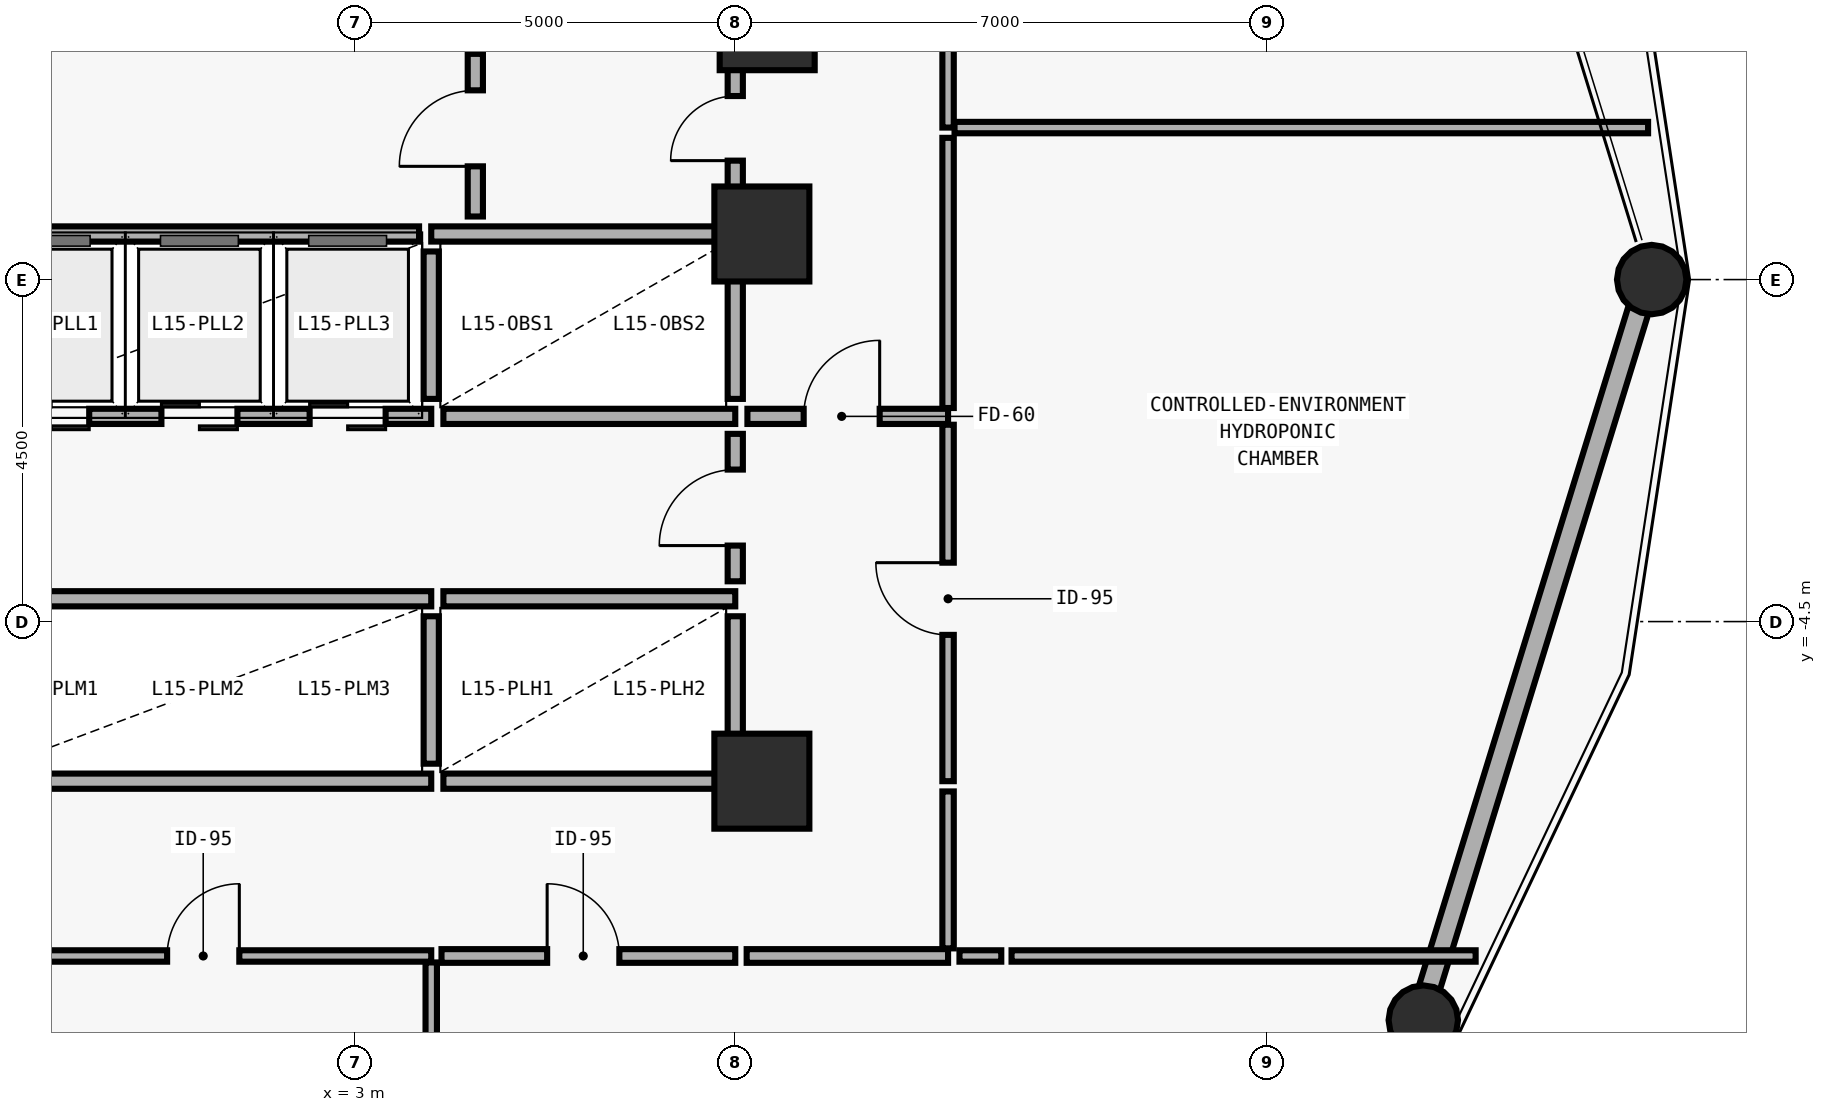
"""IFC4 building model, lengths in metres.
Left out: names, types, materials, properties, quantities, classifications, styles, units other than length and angle.
Written with IfcOpenShell. Run it as: python <this file> out.ifc"""

import sys

from ifc_helpers import new_model, si_unit, direction, frame, frame_2d, origin, origin_2d, place, context, subcontext, project, spatial, rectangle, hollow_circle, extrude, element, fill, save


model = new_model("IFC4")
c1 = context("Model", 3, precision=1e-05, world=origin(), true_north=direction((0.0, 1.0)))
c2 = subcontext(c1, "Body", "Model", "MODEL_VIEW")
j1 = project(units=[si_unit("LENGTHUNIT", "METRE"), si_unit("PLANEANGLEUNIT", "RADIAN")], contexts=[c1])
p1 = place(None, origin())
s1 = spatial("IfcSite", under=j1, at=p1, CompositionType="ELEMENT")
p2 = place(p1, origin())
s2 = spatial("IfcBuilding", under=s1, at=p2, CompositionType="ELEMENT")
p3 = place(p2, frame((0.0, 0.0, 62.7)))
s3 = spatial("IfcBuildingStorey", under=s2, at=p3, CompositionType="ELEMENT", Elevation=62.7)
for number, where, z_axis, x_axis in (
    (1, (8.42, 3.38, 0.0), (0.0, 0.0, 1.0), (1.0, 0.0, 0.0)),
    (2, (8.35, 0.6, 0.0), (0.0, 0.0, 1.0), (1.0, 0.0, 0.0)),
    (3, (8.35, -6.6, 0.0), (0.0, 0.0, 1.0), (1.0, 0.0, 0.0)),
):
    element("IfcColumn", number, at=place(p3, frame(where, z_axis=z_axis, x_axis=x_axis)), inside=s3, PredefinedType="COLUMN", context=c2, shape_type="SweptSolid", body=[
        extrude(rectangle(XDim=1.25, YDim=1.25, at=origin_2d()), origin(), (0.0, 0.0, 1.0), 3.875),
    ])
p4 = place(p3, frame((20.006, 0.0, 0.0), z_axis=(0.026515371649, 0.0, 0.999648405724), x_axis=(0.0, 1.0, 0.0)))
e4 = element("IfcColumn", 4, at=p4, inside=s3, PredefinedType="COLUMN", context=c2, shape_type="SweptSolid", body=[
    extrude(hollow_circle(Radius=0.457, WallThickness=0.032, at=origin_2d()), origin(), (0.0, 0.0, 1.0), 3.876),
])
p5 = place(p3, frame((17.008, -9.724, 0.0), z_axis=(0.022989211418, -0.01014044668, 0.999684283911), x_axis=(0.403578491135, 0.914945026487, 0.0)))
e5 = element("IfcColumn", 5, at=p5, inside=s3, PredefinedType="COLUMN", context=c2, shape_type="SweptSolid", body=[
    extrude(hollow_circle(Radius=0.457, WallThickness=0.032, at=origin_2d()), origin(), (0.0, 0.0, 1.0), 3.876),
])
p6 = place(p3, frame((19.885, -0.394, 0.0), z_axis=(0.0, 0.0, 1.0), x_axis=(-0.294639825204, -0.95560837868, 0.0)))
e6 = element("IfcWall", 6, at=p6, inside=s3, PredefinedType="SOLIDWALL", context=c2, shape_type="SweptSolid", body=[
    extrude(rectangle(XDim=9.352, YDim=0.28, at=frame_2d((4.676, 0.0))), origin(), (0.0, 0.0, 1.0), 3.06),
])
p7 = place(p3, frame((4.0, 0.6, 0.0), z_axis=(0.0, 0.0, 1.0), x_axis=(1.0, 0.0, 0.0)))
e7 = element("IfcWall", 7, at=p7, inside=s3, PredefinedType="SOLIDWALL", context=c2, shape_type="SweptSolid", body=[
    extrude(rectangle(XDim=3.88, YDim=0.2, at=frame_2d((1.94, 0.0))), origin(), (0.0, 0.0, 1.0), 3.122),
])
p8 = place(p3, frame((-2.0, -1.8, 0.0), z_axis=(0.0, 0.0, 1.0), x_axis=(1.0, 0.0, 0.0)))
e8 = element("IfcWall", 8, at=p8, inside=s3, PredefinedType="SOLIDWALL", context=c2, shape_type="SweptSolid", body=[
    extrude(rectangle(XDim=6.0, YDim=0.2, at=frame_2d((3.0, 0.0))), origin(), (0.0, 0.0, 1.0), 3.64),
])
p9 = place(p8, frame((0.5, 0.0, 0.0)))
e9 = element("IfcOpeningElement", 9, at=p9, cuts=e8, PredefinedType="OPENING", context=c2, shape_type="SweptSolid", body=[
    extrude(rectangle(XDim=1.0, YDim=2.2, at=frame_2d((0.5, 1.1))), frame((0.0, 0.11, 0.0), z_axis=(0.0, -1.0, 0.0), x_axis=(1.0, 0.0, 0.0)), (0.0, 0.0, 1.0), 0.22),
])
p10 = place(p8, frame((2.45, 0.0, 0.0)))
e10 = element("IfcOpeningElement", 10, at=p10, cuts=e8, PredefinedType="OPENING", context=c2, shape_type="SweptSolid", body=[
    extrude(rectangle(XDim=1.0, YDim=2.2, at=frame_2d((0.5, 1.1))), frame((0.0, 0.11, 0.0), z_axis=(0.0, -1.0, 0.0), x_axis=(1.0, 0.0, 0.0)), (0.0, 0.0, 1.0), 0.22),
])
p11 = place(p8, frame((4.4, 0.0, 0.0)))
e11 = element("IfcOpeningElement", 11, at=p11, cuts=e8, PredefinedType="OPENING", context=c2, shape_type="SweptSolid", body=[
    extrude(rectangle(XDim=1.0, YDim=2.2, at=frame_2d((0.5, 1.1))), frame((0.0, 0.11, 0.0), z_axis=(0.0, -1.0, 0.0), x_axis=(1.0, 0.0, 0.0)), (0.0, 0.0, 1.0), 0.22),
])
p12 = place(p3, frame((4.16, -1.8, 0.0), z_axis=(0.0, 0.0, 1.0), x_axis=(1.0, 0.0, 0.0)))
e12 = element("IfcWall", 12, at=p12, inside=s3, PredefinedType="SOLIDWALL", context=c2, shape_type="SweptSolid", body=[
    extrude(rectangle(XDim=3.84, YDim=0.2, at=frame_2d((1.92, 0.0))), origin(), (0.0, 0.0, 1.0), 3.64),
])
p13 = place(p3, frame((4.0, -1.57, 0.0), z_axis=(0.0, 0.0, 1.0), x_axis=(0.0, 1.0, 0.0)))
e13 = element("IfcWall", 13, at=p13, inside=s3, PredefinedType="SOLIDWALL", context=c2, shape_type="SweptSolid", body=[
    extrude(rectangle(XDim=1.94, YDim=0.2, at=frame_2d((0.97, 0.0))), origin(), (0.0, 0.0, 1.0), 3.64),
])
p14 = place(p3, frame((8.0, -1.57, 0.0), z_axis=(0.0, 0.0, 1.0), x_axis=(0.0, 1.0, 0.0)))
e14 = element("IfcWall", 14, at=p14, inside=s3, PredefinedType="SOLIDWALL", context=c2, shape_type="SweptSolid", body=[
    extrude(rectangle(XDim=2.05, YDim=0.2, at=frame_2d((1.025, 0.0))), origin(), (0.0, 0.0, 1.0), 3.072),
])
p15 = place(p3, frame((-2.0, -4.2, 0.0), z_axis=(0.0, 0.0, 1.0), x_axis=(1.0, 0.0, 0.0)))
e15 = element("IfcWall", 15, at=p15, inside=s3, PredefinedType="SOLIDWALL", context=c2, shape_type="SweptSolid", body=[
    extrude(rectangle(XDim=6.0, YDim=0.2, at=frame_2d((3.0, 0.0))), origin(), (0.0, 0.0, 1.0), 3.64),
])
p16 = place(p3, frame((-2.0, -6.6, 0.0), z_axis=(0.0, 0.0, 1.0), x_axis=(1.0, 0.0, 0.0)))
e16 = element("IfcWall", 16, at=p16, inside=s3, PredefinedType="SOLIDWALL", context=c2, shape_type="SweptSolid", body=[
    extrude(rectangle(XDim=6.0, YDim=0.2, at=frame_2d((3.0, 0.0))), origin(), (0.0, 0.0, 1.0), 3.122),
])
p17 = place(p3, frame((4.16, -4.2, 0.0), z_axis=(0.0, 0.0, 1.0), x_axis=(1.0, 0.0, 0.0)))
e17 = element("IfcWall", 17, at=p17, inside=s3, PredefinedType="SOLIDWALL", context=c2, shape_type="SweptSolid", body=[
    extrude(rectangle(XDim=3.84, YDim=0.2, at=frame_2d((1.92, 0.0))), origin(), (0.0, 0.0, 1.0), 3.64),
])
p18 = place(p3, frame((4.16, -6.6, 0.0), z_axis=(0.0, 0.0, 1.0), x_axis=(1.0, 0.0, 0.0)))
e18 = element("IfcWall", 18, at=p18, inside=s3, PredefinedType="SOLIDWALL", context=c2, shape_type="SweptSolid", body=[
    extrude(rectangle(XDim=3.84, YDim=0.2, at=frame_2d((1.92, 0.0))), origin(), (0.0, 0.0, 1.0), 3.122),
])
p19 = place(p3, frame((4.0, -6.37, 0.0), z_axis=(0.0, 0.0, 1.0), x_axis=(0.0, 1.0, 0.0)))
e19 = element("IfcWall", 19, at=p19, inside=s3, PredefinedType="SOLIDWALL", context=c2, shape_type="SweptSolid", body=[
    extrude(rectangle(XDim=1.94, YDim=0.2, at=frame_2d((0.97, 0.0))), origin(), (0.0, 0.0, 1.0), 3.64),
])
p20 = place(p3, frame((8.0, -6.37, 0.0), z_axis=(0.0, 0.0, 1.0), x_axis=(0.0, 1.0, 0.0)))
e20 = element("IfcWall", 20, at=p20, inside=s3, PredefinedType="SOLIDWALL", context=c2, shape_type="SweptSolid", body=[
    extrude(rectangle(XDim=1.94, YDim=0.2, at=frame_2d((0.97, 0.0))), origin(), (0.0, 0.0, 1.0), 3.072),
])
p21 = place(p3, frame((4.58, 0.83, 0.0), z_axis=(0.0, 0.0, 1.0), x_axis=(0.0, 1.0, 0.0)))
e21 = element("IfcWall", 21, at=p21, inside=s3, PredefinedType="MOVABLE", context=c2, shape_type="SweptSolid", body=[
    extrude(rectangle(XDim=2.14, YDim=0.2, at=frame_2d((1.07, 0.0))), origin(), (0.0, 0.0, 1.0), 3.64),
])
p22 = place(p21, frame((0.66, 0.0, 0.0)))
e22 = element("IfcOpeningElement", 22, at=p22, cuts=e21, PredefinedType="OPENING", context=c2, shape_type="SweptSolid", body=[
    extrude(rectangle(XDim=1.0, YDim=2.1, at=frame_2d((0.5, 1.05))), frame((0.0, 0.11, 0.0), z_axis=(0.0, -1.0, 0.0), x_axis=(1.0, 0.0, 0.0)), (0.0, 0.0, 1.0), 0.22),
])
p23 = place(p3, frame((8.0, 0.72, 0.0), z_axis=(0.0, 0.0, 1.0), x_axis=(0.0, 1.0, 0.0)))
e23 = element("IfcWall", 23, at=p23, inside=s3, PredefinedType="MOVABLE", context=c2, shape_type="SweptSolid", body=[
    extrude(rectangle(XDim=2.25, YDim=0.2, at=frame_2d((1.125, 0.0))), origin(), (0.0, 0.0, 1.0), 2.872),
])
p24 = place(p23, frame((0.845, 0.0, 0.0)))
e24 = element("IfcOpeningElement", 24, at=p24, cuts=e23, PredefinedType="OPENING", context=c2, shape_type="SweptSolid", body=[
    extrude(rectangle(XDim=0.85, YDim=2.1, at=frame_2d((0.425, 1.05))), frame((0.0, 0.11, 0.0), z_axis=(0.0, -1.0, 0.0), x_axis=(1.0, 0.0, 0.0)), (0.0, 0.0, 1.0), 0.22),
])
p25 = place(p3, frame((8.0, -3.97, 0.0), z_axis=(0.0, 0.0, 1.0), x_axis=(0.0, 1.0, 0.0)))
e25 = element("IfcWall", 25, at=p25, inside=s3, PredefinedType="MOVABLE", context=c2, shape_type="SweptSolid", body=[
    extrude(rectangle(XDim=1.94, YDim=0.2, at=frame_2d((0.97, 0.0))), origin(), (0.0, 0.0, 1.0), 3.072),
])
p26 = place(p25, frame((0.47, 0.0, 0.0)))
e26 = element("IfcOpeningElement", 26, at=p26, cuts=e25, PredefinedType="OPENING", context=c2, shape_type="SweptSolid", body=[
    extrude(rectangle(XDim=1.0, YDim=2.1, at=frame_2d((0.5, 1.05))), frame((0.0, 0.11, 0.0), z_axis=(0.0, -1.0, 0.0), x_axis=(1.0, 0.0, 0.0)), (0.0, 0.0, 1.0), 0.22),
])
p27 = place(p3, frame((8.16, -1.8, 0.0), z_axis=(0.0, 0.0, 1.0), x_axis=(1.0, 0.0, 0.0)))
e27 = element("IfcWall", 27, at=p27, inside=s3, PredefinedType="MOVABLE", context=c2, shape_type="SweptSolid", body=[
    extrude(rectangle(XDim=2.64, YDim=0.2, at=frame_2d((1.32, 0.0))), origin(), (0.0, 0.0, 1.0), 3.64),
])
p28 = place(p27, frame((0.74, 0.0, 0.0)))
e28 = element("IfcOpeningElement", 28, at=p28, cuts=e27, PredefinedType="OPENING", context=c2, shape_type="SweptSolid", body=[
    extrude(rectangle(XDim=1.0, YDim=2.1, at=frame_2d((0.5, 1.05))), frame((0.0, 0.11, 0.0), z_axis=(0.0, -1.0, 0.0), x_axis=(1.0, 0.0, 0.0)), (0.0, 0.0, 1.0), 0.22),
])
p29 = place(p3, frame((-2.0, -8.9, 0.0), z_axis=(0.0, 0.0, 1.0), x_axis=(1.0, 0.0, 0.0)))
e29 = element("IfcWall", 29, at=p29, inside=s3, PredefinedType="PARTITIONING", context=c2, shape_type="SweptSolid", body=[
    extrude(rectangle(XDim=6.0, YDim=0.15, at=frame_2d((3.0, 0.0))), origin(), (0.0, 0.0, 1.0), 3.64),
])
p30 = place(p29, frame((2.525, 0.0, 0.0)))
e30 = element("IfcOpeningElement", 30, at=p30, cuts=e29, PredefinedType="OPENING", context=c2, shape_type="SweptSolid", body=[
    extrude(rectangle(XDim=0.95, YDim=2.1, at=frame_2d((0.475, 1.05))), frame((0.0, 0.085, 0.0), z_axis=(0.0, -1.0, 0.0), x_axis=(1.0, 0.0, 0.0)), (0.0, 0.0, 1.0), 0.17),
])
p31 = place(p3, frame((4.135, -8.9, 0.0), z_axis=(0.0, 0.0, 1.0), x_axis=(1.0, 0.0, 0.0)))
e31 = element("IfcWall", 31, at=p31, inside=s3, PredefinedType="PLUMBINGWALL", context=c2, shape_type="SweptSolid", body=[
    extrude(rectangle(XDim=3.865, YDim=0.18, at=frame_2d((1.933, 0.0))), origin(), (0.0, 0.0, 1.0), 3.64),
])
p32 = place(p31, frame((1.39, 0.0, 0.0)))
e32 = element("IfcOpeningElement", 32, at=p32, cuts=e31, PredefinedType="OPENING", context=c2, shape_type="SweptSolid", body=[
    extrude(rectangle(XDim=0.95, YDim=2.1, at=frame_2d((0.475, 1.05))), frame((0.0, 0.1, 0.0), z_axis=(0.0, -1.0, 0.0), x_axis=(1.0, 0.0, 0.0)), (0.0, 0.0, 1.0), 0.2),
])
p33 = place(p3, frame((10.8, -6.6, 0.0), z_axis=(0.0, 0.0, 1.0), x_axis=(0.0, 1.0, 0.0)))
e33 = element("IfcWall", 33, at=p33, inside=s3, PredefinedType="PARTITIONING", context=c2, shape_type="SweptSolid", body=[
    extrude(rectangle(XDim=4.69, YDim=0.15, at=frame_2d((2.345, 0.0))), origin(), (0.0, 0.0, 1.0), 3.64),
])
p34 = place(p33, frame((1.925, 0.0, 0.0)))
e34 = element("IfcOpeningElement", 34, at=p34, cuts=e33, PredefinedType="OPENING", context=c2, shape_type="SweptSolid", body=[
    extrude(rectangle(XDim=0.95, YDim=2.1, at=frame_2d((0.475, 1.05))), frame((0.0, 0.085, 0.0), z_axis=(0.0, -1.0, 0.0), x_axis=(1.0, 0.0, 0.0)), (0.0, 0.0, 1.0), 0.17),
])
p35 = place(p3, frame((10.8, 2.0, 0.0), z_axis=(0.0, 0.0, 1.0), x_axis=(0.0, 1.0, 0.0)))
e35 = element("IfcWall", 35, at=p35, inside=s3, PredefinedType="PARTITIONING", context=c2, shape_type="SweptSolid", body=[
    extrude(rectangle(XDim=10.5, YDim=0.15, at=frame_2d((5.25, 0.0))), origin(), (0.0, 0.0, 1.0), 3.64),
])
p36 = place(p35, frame((4.775, 0.0, 0.0)))
e36 = element("IfcOpeningElement", 36, at=p36, cuts=e35, PredefinedType="OPENING", context=c2, shape_type="SweptSolid", body=[
    extrude(rectangle(XDim=0.95, YDim=2.1, at=frame_2d((0.475, 1.05))), frame((0.0, 0.085, 0.0), z_axis=(0.0, -1.0, 0.0), x_axis=(1.0, 0.0, 0.0)), (0.0, 0.0, 1.0), 0.17),
])
p37 = place(p3, frame((-1.88, 0.6, 0.0), z_axis=(0.0, 0.0, 1.0), x_axis=(1.0, 0.0, 0.0)))
e37 = element("IfcWall", 37, at=p37, inside=s3, PredefinedType="MOVABLE", context=c2, shape_type="SweptSolid", body=[
    extrude(rectangle(XDim=5.72, YDim=0.2, at=frame_2d((2.86, 0.0))), origin(), (0.0, 0.0, 1.0), 3.122),
])
p38 = place(p3, frame((4.0, -8.985, 0.0), z_axis=(0.0, 0.0, 1.0), x_axis=(0.0, -1.0, 0.0)))
e38 = element("IfcWall", 38, at=p38, inside=s3, PredefinedType="PARTITIONING", context=c2, shape_type="SweptSolid", body=[
    extrude(rectangle(XDim=10.204, YDim=0.15, at=frame_2d((5.102, 0.0))), origin(), (0.0, 0.0, 1.0), 3.64),
])
p39 = place(p3, frame((8.15, -8.9, 0.0), z_axis=(0.0, 0.0, 1.0), x_axis=(1.0, 0.0, 0.0)))
e39 = element("IfcWall", 39, at=p39, inside=s3, PredefinedType="PLUMBINGWALL", context=c2, shape_type="SweptSolid", body=[
    extrude(rectangle(XDim=2.65, YDim=0.18, at=frame_2d((1.325, 0.0))), origin(), (0.0, 0.0, 1.0), 3.64),
])
p40 = place(p3, frame((10.95, -8.9, 0.0), z_axis=(0.0, 0.0, 1.0), x_axis=(1.0, 0.0, 0.0)))
e40 = element("IfcWall", 40, at=p40, inside=s3, PredefinedType="PARTITIONING", context=c2, shape_type="SweptSolid", body=[
    extrude(rectangle(XDim=0.55, YDim=0.15, at=frame_2d((0.275, 0.0))), origin(), (0.0, 0.0, 1.0), 3.64),
])
p41 = place(p3, frame((11.635, -8.9, 0.0), z_axis=(0.0, 0.0, 1.0), x_axis=(1.0, 0.0, 0.0)))
e41 = element("IfcWall", 41, at=p41, inside=s3, PredefinedType="PARTITIONING", context=c2, shape_type="SweptSolid", body=[
    extrude(rectangle(XDim=6.106, YDim=0.15, at=frame_2d((3.053, 0.0))), origin(), (0.0, 0.0, 1.0), 2.972),
])
p42 = place(p3, frame((10.8, -8.8, 0.0), z_axis=(0.0, 0.0, 1.0), x_axis=(0.0, 1.0, 0.0)))
e42 = element("IfcWall", 42, at=p42, inside=s3, PredefinedType="PARTITIONING", context=c2, shape_type="SweptSolid", body=[
    extrude(rectangle(XDim=2.065, YDim=0.15, at=frame_2d((1.032, 0.0))), origin(), (0.0, 0.0, 1.0), 3.64),
])
p43 = place(p3, frame((10.8, -1.69, 0.0), z_axis=(0.0, 0.0, 1.0), x_axis=(0.0, 1.0, 0.0)))
e43 = element("IfcWall", 43, at=p43, inside=s3, PredefinedType="PARTITIONING", context=c2, shape_type="SweptSolid", body=[
    extrude(rectangle(XDim=3.555, YDim=0.15, at=frame_2d((1.777, 0.0))), origin(), (0.0, 0.0, 1.0), 3.64),
])
p44 = place(p3, frame((10.885, 2.0, 0.0), z_axis=(0.0, 0.0, 1.0), x_axis=(1.0, 0.0, 0.0)))
e44 = element("IfcWall", 44, at=p44, inside=s3, PredefinedType="PARTITIONING", context=c2, shape_type="SweptSolid", body=[
    extrude(rectangle(XDim=9.125, YDim=0.15, at=frame_2d((4.562, 0.0))), origin(), (0.0, 0.0, 1.0), 3.64),
])
p45 = place(p22, origin())
e45 = element("IfcDoor", 45, at=p45, inside=s3, OperationType="SINGLE_SWING_LEFT", PredefinedType="DOOR", context=c2, shape_type="SweptSolid", body=[
    extrude(rectangle(XDim=1.0, YDim=2.1, at=frame_2d((0.5, 1.05))), frame((0.0, 0.025, 0.0), z_axis=(0.0, -1.0, 0.0), x_axis=(1.0, 0.0, 0.0)), (0.0, 0.0, 1.0), 0.05),
])
fill(e22, e45)
p46 = place(p24, origin())
e46 = element("IfcDoor", 46, at=p46, inside=s3, OperationType="SINGLE_SWING_LEFT", PredefinedType="DOOR", context=c2, shape_type="SweptSolid", body=[
    extrude(rectangle(XDim=0.85, YDim=2.1, at=frame_2d((0.425, 1.05))), frame((0.0, 0.025, 0.0), z_axis=(0.0, -1.0, 0.0), x_axis=(1.0, 0.0, 0.0)), (0.0, 0.0, 1.0), 0.05),
])
fill(e24, e46)
p47 = place(p26, origin())
e47 = element("IfcDoor", 47, at=p47, inside=s3, OperationType="SINGLE_SWING_LEFT", PredefinedType="DOOR", context=c2, shape_type="SweptSolid", body=[
    extrude(rectangle(XDim=1.0, YDim=2.1, at=frame_2d((0.5, 1.05))), frame((0.0, 0.025, 0.0), z_axis=(0.0, -1.0, 0.0), x_axis=(1.0, 0.0, 0.0)), (0.0, 0.0, 1.0), 0.05),
])
fill(e26, e47)
p48 = place(p28, origin())
e48 = element("IfcDoor", 48, at=p48, inside=s3, OperationType="SINGLE_SWING_RIGHT", PredefinedType="DOOR", context=c2, shape_type="SweptSolid", body=[
    extrude(rectangle(XDim=1.0, YDim=2.1, at=frame_2d((0.5, 1.05))), frame((0.0, 0.025, 0.0), z_axis=(0.0, -1.0, 0.0), x_axis=(1.0, 0.0, 0.0)), (0.0, 0.0, 1.0), 0.05),
])
fill(e28, e48)
p49 = place(p30, origin())
e49 = element("IfcDoor", 49, at=p49, inside=s3, OperationType="SINGLE_SWING_RIGHT", PredefinedType="DOOR", context=c2, shape_type="SweptSolid", body=[
    extrude(rectangle(XDim=0.95, YDim=2.1, at=frame_2d((0.475, 1.05))), frame((0.0, 0.025, 0.0), z_axis=(0.0, -1.0, 0.0), x_axis=(1.0, 0.0, 0.0)), (0.0, 0.0, 1.0), 0.05),
])
fill(e30, e49)
p50 = place(p32, origin())
e50 = element("IfcDoor", 50, at=p50, inside=s3, OperationType="SINGLE_SWING_LEFT", PredefinedType="DOOR", context=c2, shape_type="SweptSolid", body=[
    extrude(rectangle(XDim=0.95, YDim=2.1, at=frame_2d((0.475, 1.05))), frame((0.0, 0.025, 0.0), z_axis=(0.0, -1.0, 0.0), x_axis=(1.0, 0.0, 0.0)), (0.0, 0.0, 1.0), 0.05),
])
fill(e32, e50)
p51 = place(p34, origin())
e51 = element("IfcDoor", 51, at=p51, inside=s3, OperationType="SINGLE_SWING_RIGHT", PredefinedType="DOOR", context=c2, shape_type="SweptSolid", body=[
    extrude(rectangle(XDim=0.95, YDim=2.1, at=frame_2d((0.475, 1.05))), frame((0.0, 0.025, 0.0), z_axis=(0.0, -1.0, 0.0), x_axis=(1.0, 0.0, 0.0)), (0.0, 0.0, 1.0), 0.05),
])
fill(e34, e51)
p52 = place(p9, origin())
e52 = element("IfcDoor", 52, at=p52, inside=s3, OperationType="DOUBLE_DOOR_SLIDING", PredefinedType="DOOR", context=c2, shape_type="SweptSolid", body=[
    extrude(rectangle(XDim=1.0, YDim=2.2, at=frame_2d((0.5, 1.1))), frame((0.0, 0.025, 0.0), z_axis=(0.0, -1.0, 0.0), x_axis=(1.0, 0.0, 0.0)), (0.0, 0.0, 1.0), 0.05),
])
fill(e9, e52)
p53 = place(p10, origin())
e53 = element("IfcDoor", 53, at=p53, inside=s3, OperationType="DOUBLE_DOOR_SLIDING", PredefinedType="DOOR", context=c2, shape_type="SweptSolid", body=[
    extrude(rectangle(XDim=1.0, YDim=2.2, at=frame_2d((0.5, 1.1))), frame((0.0, 0.025, 0.0), z_axis=(0.0, -1.0, 0.0), x_axis=(1.0, 0.0, 0.0)), (0.0, 0.0, 1.0), 0.05),
])
fill(e10, e53)
p54 = place(p11, origin())
e54 = element("IfcDoor", 54, at=p54, inside=s3, OperationType="DOUBLE_DOOR_SLIDING", PredefinedType="DOOR", context=c2, shape_type="SweptSolid", body=[
    extrude(rectangle(XDim=1.0, YDim=2.2, at=frame_2d((0.5, 1.1))), frame((0.0, 0.025, 0.0), z_axis=(0.0, -1.0, 0.0), x_axis=(1.0, 0.0, 0.0)), (0.0, 0.0, 1.0), 0.05),
])
fill(e11, e54)
save(model, sys.argv[1])
